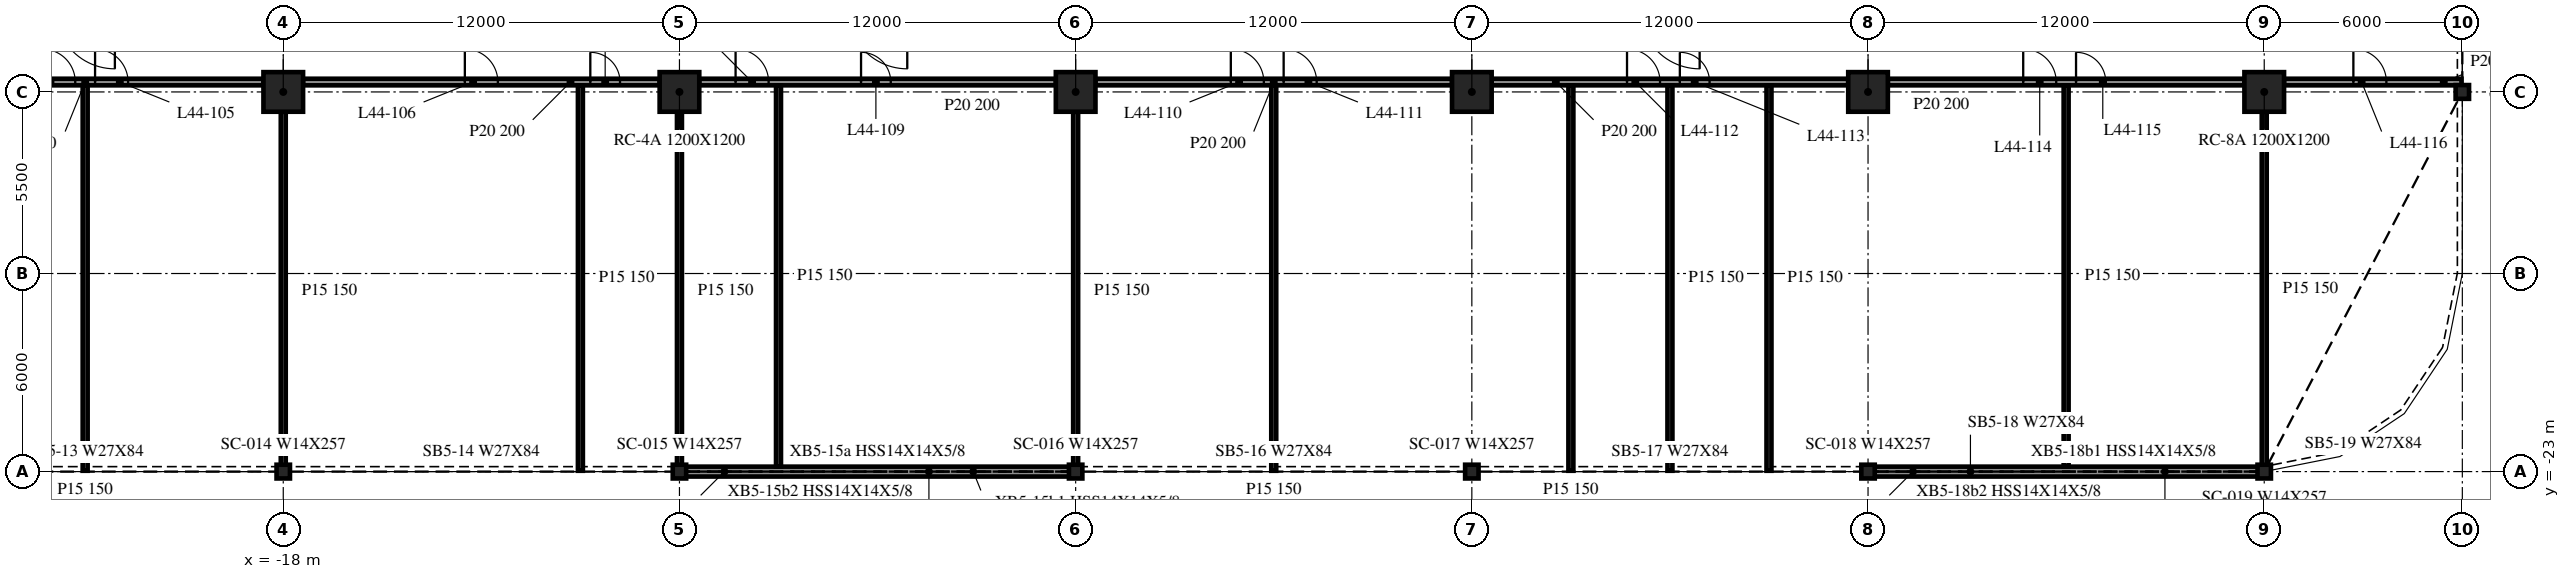
"""IFC4 building model, lengths in metres.
Left out: names, types, materials, properties, quantities, classifications, styles, units other than length and angle.
Written with IfcOpenShell. Run it as: python <this file> out.ifc"""

import sys

from ifc_helpers import new_model, si_unit, direction, frame, frame_2d, origin, origin_2d, place, context, subcontext, project, spatial, rectangle, i_section, extrude, element, fill, save


model = new_model("IFC4")
c1 = context("Model", 3, precision=1e-05, world=origin(), true_north=direction((0.0, 1.0)))
c2 = subcontext(c1, "Body", "Model", "MODEL_VIEW")
j1 = project(units=[si_unit("LENGTHUNIT", "METRE"), si_unit("PLANEANGLEUNIT", "RADIAN")], contexts=[c1])
p1 = place(None, origin())
s1 = spatial("IfcSite", under=j1, at=p1, CompositionType="ELEMENT")
p2 = place(p1, origin())
s2 = spatial("IfcBuilding", under=s1, at=p2, CompositionType="ELEMENT")
p3 = place(p2, frame((0.0, 0.0, 185.8)))
s3 = spatial("IfcBuildingStorey", under=s2, at=p3, CompositionType="ELEMENT", Elevation=185.8)
for number, where, z_axis, x_axis in (
    (1, (-18.0, -11.5, -0.34), (0.0, 0.0, 1.0), (1.0, 0.0, 0.0)),
    (2, (-6.0, -11.5, -0.34), (0.0, 0.0, 1.0), (1.0, 0.0, 0.0)),
    (3, (6.0, -11.5, -0.34), (0.0, 0.0, 1.0), (1.0, 0.0, 0.0)),
    (4, (18.0, -11.5, -0.34), (0.0, 0.0, 1.0), (1.0, 0.0, 0.0)),
    (5, (30.0, -11.5, -0.34), (0.0, 0.0, 1.0), (1.0, 0.0, 0.0)),
    (6, (42.0, -11.5, -0.34), (0.0, 0.0, 1.0), (1.0, 0.0, 0.0)),
):
    element("IfcColumn", number, at=place(p3, frame(where, z_axis=z_axis, x_axis=x_axis)), inside=s3, PredefinedType="COLUMN", context=c2, shape_type="SweptSolid", body=[
        extrude(rectangle(XDim=1.2, YDim=1.2, at=origin_2d()), origin(), (0.0, 0.0, 1.0), 3.74),
    ])
for number, where, z_axis, x_axis in (
    (7, (-18.0, -23.0, -0.34), (0.0, 0.0, 1.0), (1.0, 0.0, 0.0)),
    (8, (-6.0, -23.0, -0.34), (0.0, 0.0, 1.0), (1.0, 0.0, 0.0)),
    (9, (6.0, -23.0, -0.34), (0.0, 0.0, 1.0), (1.0, 0.0, 0.0)),
    (10, (18.0, -23.0, -0.34), (0.0, 0.0, 1.0), (1.0, 0.0, 0.0)),
    (11, (30.0, -23.0, -0.34), (0.0, 0.0, 1.0), (1.0, 0.0, 0.0)),
    (12, (42.0, -23.0, -0.34), (0.0, 0.0, 1.0), (1.0, 0.0, 0.0)),
    (13, (48.0, -11.5, -0.34), (0.0, 0.0, 1.0), (1.0, 0.0, 0.0)),
):
    element("IfcColumn", number, at=place(p3, frame(where, z_axis=z_axis, x_axis=x_axis)), inside=s3, PredefinedType="COLUMN", context=c2, shape_type="SweptSolid", body=[
        extrude(i_section(OverallWidth=0.406, OverallDepth=0.417, WebThickness=0.03, FlangeThickness=0.048, at=origin_2d()), origin(), (0.0, 0.0, 1.0), 3.74),
    ])
for number, where, z_axis, x_axis in (
    (14, (-5.985, -23.0, 0.0), (0.0, 0.0, 1.0), (1.0, 0.0, 0.0)),
    (15, (30.015, -23.0, 0.0), (0.0, 0.0, 1.0), (1.0, 0.0, 0.0)),
):
    element("IfcWall", number, at=place(p3, frame(where, z_axis=z_axis, x_axis=x_axis)), inside=s3, PredefinedType="NOTDEFINED", context=c2, shape_type="SweptSolid", body=[
        extrude(rectangle(XDim=11.97, YDim=0.3, at=frame_2d((5.985, 0.0))), origin(), (0.0, 0.0, 1.0), 3.4),
    ])
p4 = place(p3, frame((-29.4, -11.2, 0.0), z_axis=(0.0, 0.0, 1.0), x_axis=(1.0, 0.0, 0.0)))
e16 = element("IfcWall", 16, at=p4, inside=s3, PredefinedType="PARTITIONING", context=c2, shape_type="SweptSolid", body=[
    extrude(rectangle(XDim=10.8, YDim=0.2, at=frame_2d((5.4, 0.0))), origin(), (0.0, 0.0, 1.0), 3.4),
])
p5 = place(p4, frame((4.1, 0.0, 0.0)))
e17 = element("IfcOpeningElement", 17, at=p5, cuts=e16, PredefinedType="OPENING", context=c2, shape_type="SweptSolid", body=[
    extrude(rectangle(XDim=1.0, YDim=2.1, at=frame_2d((0.5, 1.05))), frame((0.0, 0.11, 0.0), z_axis=(0.0, -1.0, 0.0), x_axis=(1.0, 0.0, 0.0)), (0.0, 0.0, 1.0), 0.22),
])
p6 = place(p4, frame((5.7, 0.0, 0.0)))
e18 = element("IfcOpeningElement", 18, at=p6, cuts=e16, PredefinedType="OPENING", context=c2, shape_type="SweptSolid", body=[
    extrude(rectangle(XDim=1.0, YDim=2.1, at=frame_2d((0.5, 1.05))), frame((0.0, 0.11, 0.0), z_axis=(0.0, -1.0, 0.0), x_axis=(1.0, 0.0, 0.0)), (0.0, 0.0, 1.0), 0.22),
])
p7 = place(p3, frame((-17.4, -11.2, 0.0), z_axis=(0.0, 0.0, 1.0), x_axis=(1.0, 0.0, 0.0)))
e19 = element("IfcWall", 19, at=p7, inside=s3, PredefinedType="PARTITIONING", context=c2, shape_type="SweptSolid", body=[
    extrude(rectangle(XDim=10.8, YDim=0.2, at=frame_2d((5.4, 0.0))), origin(), (0.0, 0.0, 1.0), 3.4),
])
p8 = place(p7, frame((4.9, 0.0, 0.0)))
e20 = element("IfcOpeningElement", 20, at=p8, cuts=e19, PredefinedType="OPENING", context=c2, shape_type="SweptSolid", body=[
    extrude(rectangle(XDim=1.0, YDim=2.1, at=frame_2d((0.5, 1.05))), frame((0.0, 0.11, 0.0), z_axis=(0.0, -1.0, 0.0), x_axis=(1.0, 0.0, 0.0)), (0.0, 0.0, 1.0), 0.22),
])
p9 = place(p7, frame((8.7, 0.0, 0.0)))
e21 = element("IfcOpeningElement", 21, at=p9, cuts=e19, PredefinedType="OPENING", context=c2, shape_type="SweptSolid", body=[
    extrude(rectangle(XDim=0.9, YDim=2.1, at=frame_2d((0.45, 1.05))), frame((0.0, 0.11, 0.0), z_axis=(0.0, -1.0, 0.0), x_axis=(1.0, 0.0, 0.0)), (0.0, 0.0, 1.0), 0.22),
])
p10 = place(p3, frame((-5.4, -11.2, 0.0), z_axis=(0.0, 0.0, 1.0), x_axis=(1.0, 0.0, 0.0)))
e22 = element("IfcWall", 22, at=p10, inside=s3, PredefinedType="PARTITIONING", context=c2, shape_type="SweptSolid", body=[
    extrude(rectangle(XDim=10.8, YDim=0.2, at=frame_2d((5.4, 0.0))), origin(), (0.0, 0.0, 1.0), 3.4),
])
p11 = place(p10, frame((1.1, 0.0, 0.0)))
e23 = element("IfcOpeningElement", 23, at=p11, cuts=e22, PredefinedType="OPENING", context=c2, shape_type="SweptSolid", body=[
    extrude(rectangle(XDim=1.0, YDim=2.1, at=frame_2d((0.5, 1.05))), frame((0.0, 0.11, 0.0), z_axis=(0.0, -1.0, 0.0), x_axis=(1.0, 0.0, 0.0)), (0.0, 0.0, 1.0), 0.22),
])
p12 = place(p10, frame((4.9, 0.0, 0.0)))
e24 = element("IfcOpeningElement", 24, at=p12, cuts=e22, PredefinedType="OPENING", context=c2, shape_type="SweptSolid", body=[
    extrude(rectangle(XDim=0.9, YDim=2.1, at=frame_2d((0.45, 1.05))), frame((0.0, 0.11, 0.0), z_axis=(0.0, -1.0, 0.0), x_axis=(1.0, 0.0, 0.0)), (0.0, 0.0, 1.0), 0.22),
])
p13 = place(p3, frame((6.6, -11.2, 0.0), z_axis=(0.0, 0.0, 1.0), x_axis=(1.0, 0.0, 0.0)))
e25 = element("IfcWall", 25, at=p13, inside=s3, PredefinedType="PARTITIONING", context=c2, shape_type="SweptSolid", body=[
    extrude(rectangle(XDim=10.8, YDim=0.2, at=frame_2d((5.4, 0.0))), origin(), (0.0, 0.0, 1.0), 3.4),
])
p14 = place(p13, frame((4.1, 0.0, 0.0)))
e26 = element("IfcOpeningElement", 26, at=p14, cuts=e25, PredefinedType="OPENING", context=c2, shape_type="SweptSolid", body=[
    extrude(rectangle(XDim=1.0, YDim=2.1, at=frame_2d((0.5, 1.05))), frame((0.0, 0.11, 0.0), z_axis=(0.0, -1.0, 0.0), x_axis=(1.0, 0.0, 0.0)), (0.0, 0.0, 1.0), 0.22),
])
p15 = place(p13, frame((5.7, 0.0, 0.0)))
e27 = element("IfcOpeningElement", 27, at=p15, cuts=e25, PredefinedType="OPENING", context=c2, shape_type="SweptSolid", body=[
    extrude(rectangle(XDim=1.0, YDim=2.1, at=frame_2d((0.5, 1.05))), frame((0.0, 0.11, 0.0), z_axis=(0.0, -1.0, 0.0), x_axis=(1.0, 0.0, 0.0)), (0.0, 0.0, 1.0), 0.22),
])
p16 = place(p3, frame((18.6, -11.2, 0.0), z_axis=(0.0, 0.0, 1.0), x_axis=(1.0, 0.0, 0.0)))
e28 = element("IfcWall", 28, at=p16, inside=s3, PredefinedType="PARTITIONING", context=c2, shape_type="SweptSolid", body=[
    extrude(rectangle(XDim=10.8, YDim=0.2, at=frame_2d((5.4, 0.0))), origin(), (0.0, 0.0, 1.0), 3.4),
])
p17 = place(p16, frame((4.1, 0.0, 0.0)))
e29 = element("IfcOpeningElement", 29, at=p17, cuts=e28, PredefinedType="OPENING", context=c2, shape_type="SweptSolid", body=[
    extrude(rectangle(XDim=1.0, YDim=2.1, at=frame_2d((0.5, 1.05))), frame((0.0, 0.11, 0.0), z_axis=(0.0, -1.0, 0.0), x_axis=(1.0, 0.0, 0.0)), (0.0, 0.0, 1.0), 0.22),
])
p18 = place(p16, frame((5.7, 0.0, 0.0)))
e30 = element("IfcOpeningElement", 30, at=p18, cuts=e28, PredefinedType="OPENING", context=c2, shape_type="SweptSolid", body=[
    extrude(rectangle(XDim=0.9, YDim=2.1, at=frame_2d((0.45, 1.05))), frame((0.0, 0.11, 0.0), z_axis=(0.0, -1.0, 0.0), x_axis=(1.0, 0.0, 0.0)), (0.0, 0.0, 1.0), 0.22),
])
p19 = place(p3, frame((30.6, -11.2, 0.0), z_axis=(0.0, 0.0, 1.0), x_axis=(1.0, 0.0, 0.0)))
e31 = element("IfcWall", 31, at=p19, inside=s3, PredefinedType="PARTITIONING", context=c2, shape_type="SweptSolid", body=[
    extrude(rectangle(XDim=10.8, YDim=0.2, at=frame_2d((5.4, 0.0))), origin(), (0.0, 0.0, 1.0), 2.401),
])
p20 = place(p19, frame((4.1, 0.0, 0.0)))
e32 = element("IfcOpeningElement", 32, at=p20, cuts=e31, PredefinedType="OPENING", context=c2, shape_type="SweptSolid", body=[
    extrude(rectangle(XDim=1.0, YDim=2.1, at=frame_2d((0.5, 1.05))), frame((0.0, 0.11, 0.0), z_axis=(0.0, -1.0, 0.0), x_axis=(1.0, 0.0, 0.0)), (0.0, 0.0, 1.0), 0.22),
])
p21 = place(p19, frame((5.7, 0.0, 0.0)))
e33 = element("IfcOpeningElement", 33, at=p21, cuts=e31, PredefinedType="OPENING", context=c2, shape_type="SweptSolid", body=[
    extrude(rectangle(XDim=0.9, YDim=2.1, at=frame_2d((0.45, 1.05))), frame((0.0, 0.11, 0.0), z_axis=(0.0, -1.0, 0.0), x_axis=(1.0, 0.0, 0.0)), (0.0, 0.0, 1.0), 0.22),
])
p22 = place(p3, frame((42.6, -11.2, 0.0), z_axis=(0.0, 0.0, 1.0), x_axis=(1.0, 0.0, 0.0)))
e34 = element("IfcWall", 34, at=p22, inside=s3, PredefinedType="PARTITIONING", context=c2, shape_type="SweptSolid", body=[
    extrude(rectangle(XDim=5.375, YDim=0.2, at=frame_2d((2.688, 0.0))), origin(), (0.0, 0.0, 1.0), 2.401),
])
p23 = place(p22, frame((2.1, 0.0, 0.0)))
e35 = element("IfcOpeningElement", 35, at=p23, cuts=e34, PredefinedType="OPENING", context=c2, shape_type="SweptSolid", body=[
    extrude(rectangle(XDim=1.0, YDim=2.1, at=frame_2d((0.5, 1.05))), frame((0.0, 0.11, 0.0), z_axis=(0.0, -1.0, 0.0), x_axis=(1.0, 0.0, 0.0)), (0.0, 0.0, 1.0), 0.22),
])
p24 = place(p3, frame((-24.0, -22.975, 0.0), z_axis=(0.0, 0.0, 1.0), x_axis=(0.0, 1.0, 0.0)))
e36 = element("IfcWall", 36, at=p24, inside=s3, PredefinedType="PARTITIONING", context=c2, shape_type="SweptSolid", body=[
    extrude(rectangle(XDim=11.675, YDim=0.15, at=frame_2d((5.837, 0.0))), origin(), (0.0, 0.0, 1.0), 3.4),
])
p25 = place(p3, frame((-18.0, -22.975, 0.0), z_axis=(0.0, 0.0, 1.0), x_axis=(0.0, 1.0, 0.0)))
e37 = element("IfcWall", 37, at=p25, inside=s3, PredefinedType="PARTITIONING", context=c2, shape_type="SweptSolid", body=[
    extrude(rectangle(XDim=10.875, YDim=0.15, at=frame_2d((5.438, 0.0))), origin(), (0.0, 0.0, 1.0), 3.4),
])
p26 = place(p3, frame((-9.0, -22.975, 0.0), z_axis=(0.0, 0.0, 1.0), x_axis=(0.0, 1.0, 0.0)))
e38 = element("IfcWall", 38, at=p26, inside=s3, PredefinedType="PARTITIONING", context=c2, shape_type="SweptSolid", body=[
    extrude(rectangle(XDim=11.675, YDim=0.15, at=frame_2d((5.837, 0.0))), origin(), (0.0, 0.0, 1.0), 3.4),
])
p27 = place(p3, frame((-6.0, -22.975, 0.0), z_axis=(0.0, 0.0, 1.0), x_axis=(0.0, 1.0, 0.0)))
e39 = element("IfcWall", 39, at=p27, inside=s3, PredefinedType="PARTITIONING", context=c2, shape_type="SweptSolid", body=[
    extrude(rectangle(XDim=10.875, YDim=0.15, at=frame_2d((5.438, 0.0))), origin(), (0.0, 0.0, 1.0), 3.4),
])
p28 = place(p3, frame((-3.0, -22.85, 0.0), z_axis=(0.0, 0.0, 1.0), x_axis=(0.0, 1.0, 0.0)))
e40 = element("IfcWall", 40, at=p28, inside=s3, PredefinedType="PARTITIONING", context=c2, shape_type="SweptSolid", body=[
    extrude(rectangle(XDim=11.55, YDim=0.15, at=frame_2d((5.775, 0.0))), origin(), (0.0, 0.0, 1.0), 3.4),
])
p29 = place(p3, frame((6.0, -22.975, 0.0), z_axis=(0.0, 0.0, 1.0), x_axis=(0.0, 1.0, 0.0)))
e41 = element("IfcWall", 41, at=p29, inside=s3, PredefinedType="PARTITIONING", context=c2, shape_type="SweptSolid", body=[
    extrude(rectangle(XDim=10.875, YDim=0.15, at=frame_2d((5.438, 0.0))), origin(), (0.0, 0.0, 1.0), 3.4),
])
for number, where, z_axis, x_axis in (
    (42, (12.0, -22.975, 0.0), (0.0, 0.0, 1.0), (0.0, 1.0, 0.0)),
    (43, (21.0, -22.975, 0.0), (0.0, 0.0, 1.0), (0.0, 1.0, 0.0)),
    (44, (24.0, -22.975, 0.0), (0.0, 0.0, 1.0), (0.0, 1.0, 0.0)),
    (45, (27.0, -22.975, 0.0), (0.0, 0.0, 1.0), (0.0, 1.0, 0.0)),
):
    element("IfcWall", number, at=place(p3, frame(where, z_axis=z_axis, x_axis=x_axis)), inside=s3, PredefinedType="PARTITIONING", context=c2, shape_type="SweptSolid", body=[
        extrude(rectangle(XDim=11.675, YDim=0.15, at=frame_2d((5.837, 0.0))), origin(), (0.0, 0.0, 1.0), 3.4),
    ])
p30 = place(p3, frame((36.0, -22.85, 0.0), z_axis=(0.0, 0.0, 1.0), x_axis=(0.0, 1.0, 0.0)))
e46 = element("IfcWall", 46, at=p30, inside=s3, PredefinedType="PARTITIONING", context=c2, shape_type="SweptSolid", body=[
    extrude(rectangle(XDim=11.55, YDim=0.15, at=frame_2d((5.775, 0.0))), origin(), (0.0, 0.0, 1.0), 3.4),
])
p31 = place(p3, frame((42.0, -22.847, 0.0), z_axis=(0.0, 0.0, 1.0), x_axis=(0.0, 1.0, 0.0)))
e47 = element("IfcWall", 47, at=p31, inside=s3, PredefinedType="PARTITIONING", context=c2, shape_type="SweptSolid", body=[
    extrude(rectangle(XDim=10.747, YDim=0.15, at=frame_2d((5.374, 0.0))), origin(), (0.0, 0.0, 1.0), 3.4),
])
p32 = place(p5, origin())
e48 = element("IfcDoor", 48, at=p32, inside=s3, OperationType="SINGLE_SWING_RIGHT", PredefinedType="DOOR", context=c2, shape_type="SweptSolid", body=[
    extrude(rectangle(XDim=1.0, YDim=2.1, at=frame_2d((0.5, 1.05))), frame((0.0, 0.025, 0.0), z_axis=(0.0, -1.0, 0.0), x_axis=(1.0, 0.0, 0.0)), (0.0, 0.0, 1.0), 0.05),
])
fill(e17, e48)
p33 = place(p6, origin())
e49 = element("IfcDoor", 49, at=p33, inside=s3, OperationType="SINGLE_SWING_LEFT", PredefinedType="DOOR", context=c2, shape_type="SweptSolid", body=[
    extrude(rectangle(XDim=1.0, YDim=2.1, at=frame_2d((0.5, 1.05))), frame((0.0, 0.025, 0.0), z_axis=(0.0, -1.0, 0.0), x_axis=(1.0, 0.0, 0.0)), (0.0, 0.0, 1.0), 0.05),
])
fill(e18, e49)
p34 = place(p8, origin())
e50 = element("IfcDoor", 50, at=p34, inside=s3, OperationType="SINGLE_SWING_LEFT", PredefinedType="DOOR", context=c2, shape_type="SweptSolid", body=[
    extrude(rectangle(XDim=1.0, YDim=2.1, at=frame_2d((0.5, 1.05))), frame((0.0, 0.025, 0.0), z_axis=(0.0, -1.0, 0.0), x_axis=(1.0, 0.0, 0.0)), (0.0, 0.0, 1.0), 0.05),
])
fill(e20, e50)
p35 = place(p9, origin())
e51 = element("IfcDoor", 51, at=p35, inside=s3, OperationType="SINGLE_SWING_LEFT", PredefinedType="DOOR", context=c2, shape_type="SweptSolid", body=[
    extrude(rectangle(XDim=0.9, YDim=2.1, at=frame_2d((0.45, 1.05))), frame((0.0, 0.025, 0.0), z_axis=(0.0, -1.0, 0.0), x_axis=(1.0, 0.0, 0.0)), (0.0, 0.0, 1.0), 0.05),
])
fill(e21, e51)
p36 = place(p11, origin())
e52 = element("IfcDoor", 52, at=p36, inside=s3, OperationType="SINGLE_SWING_RIGHT", PredefinedType="DOOR", context=c2, shape_type="SweptSolid", body=[
    extrude(rectangle(XDim=1.0, YDim=2.1, at=frame_2d((0.5, 1.05))), frame((0.0, 0.025, 0.0), z_axis=(0.0, -1.0, 0.0), x_axis=(1.0, 0.0, 0.0)), (0.0, 0.0, 1.0), 0.05),
])
fill(e23, e52)
p37 = place(p12, origin())
e53 = element("IfcDoor", 53, at=p37, inside=s3, OperationType="SINGLE_SWING_RIGHT", PredefinedType="DOOR", context=c2, shape_type="SweptSolid", body=[
    extrude(rectangle(XDim=0.9, YDim=2.1, at=frame_2d((0.45, 1.05))), frame((0.0, 0.025, 0.0), z_axis=(0.0, -1.0, 0.0), x_axis=(1.0, 0.0, 0.0)), (0.0, 0.0, 1.0), 0.05),
])
fill(e24, e53)
p38 = place(p14, origin())
e54 = element("IfcDoor", 54, at=p38, inside=s3, OperationType="SINGLE_SWING_RIGHT", PredefinedType="DOOR", context=c2, shape_type="SweptSolid", body=[
    extrude(rectangle(XDim=1.0, YDim=2.1, at=frame_2d((0.5, 1.05))), frame((0.0, 0.025, 0.0), z_axis=(0.0, -1.0, 0.0), x_axis=(1.0, 0.0, 0.0)), (0.0, 0.0, 1.0), 0.05),
])
fill(e26, e54)
p39 = place(p15, origin())
e55 = element("IfcDoor", 55, at=p39, inside=s3, OperationType="SINGLE_SWING_LEFT", PredefinedType="DOOR", context=c2, shape_type="SweptSolid", body=[
    extrude(rectangle(XDim=1.0, YDim=2.1, at=frame_2d((0.5, 1.05))), frame((0.0, 0.025, 0.0), z_axis=(0.0, -1.0, 0.0), x_axis=(1.0, 0.0, 0.0)), (0.0, 0.0, 1.0), 0.05),
])
fill(e27, e55)
p40 = place(p17, origin())
e56 = element("IfcDoor", 56, at=p40, inside=s3, OperationType="SINGLE_SWING_RIGHT", PredefinedType="DOOR", context=c2, shape_type="SweptSolid", body=[
    extrude(rectangle(XDim=1.0, YDim=2.1, at=frame_2d((0.5, 1.05))), frame((0.0, 0.025, 0.0), z_axis=(0.0, -1.0, 0.0), x_axis=(1.0, 0.0, 0.0)), (0.0, 0.0, 1.0), 0.05),
])
fill(e29, e56)
p41 = place(p18, origin())
e57 = element("IfcDoor", 57, at=p41, inside=s3, OperationType="SINGLE_SWING_LEFT", PredefinedType="DOOR", context=c2, shape_type="SweptSolid", body=[
    extrude(rectangle(XDim=0.9, YDim=2.1, at=frame_2d((0.45, 1.05))), frame((0.0, 0.025, 0.0), z_axis=(0.0, -1.0, 0.0), x_axis=(1.0, 0.0, 0.0)), (0.0, 0.0, 1.0), 0.05),
])
fill(e30, e57)
p42 = place(p20, origin())
e58 = element("IfcDoor", 58, at=p42, inside=s3, OperationType="SINGLE_SWING_RIGHT", PredefinedType="DOOR", context=c2, shape_type="SweptSolid", body=[
    extrude(rectangle(XDim=1.0, YDim=2.1, at=frame_2d((0.5, 1.05))), frame((0.0, 0.025, 0.0), z_axis=(0.0, -1.0, 0.0), x_axis=(1.0, 0.0, 0.0)), (0.0, 0.0, 1.0), 0.05),
])
fill(e32, e58)
p43 = place(p21, origin())
e59 = element("IfcDoor", 59, at=p43, inside=s3, OperationType="SINGLE_SWING_LEFT", PredefinedType="DOOR", context=c2, shape_type="SweptSolid", body=[
    extrude(rectangle(XDim=0.9, YDim=2.1, at=frame_2d((0.45, 1.05))), frame((0.0, 0.025, 0.0), z_axis=(0.0, -1.0, 0.0), x_axis=(1.0, 0.0, 0.0)), (0.0, 0.0, 1.0), 0.05),
])
fill(e33, e59)
p44 = place(p23, origin())
e60 = element("IfcDoor", 60, at=p44, inside=s3, OperationType="SINGLE_SWING_RIGHT", PredefinedType="DOOR", context=c2, shape_type="SweptSolid", body=[
    extrude(rectangle(XDim=1.0, YDim=2.1, at=frame_2d((0.5, 1.05))), frame((0.0, 0.025, 0.0), z_axis=(0.0, -1.0, 0.0), x_axis=(1.0, 0.0, 0.0)), (0.0, 0.0, 1.0), 0.05),
])
fill(e35, e60)
save(model, sys.argv[1])
